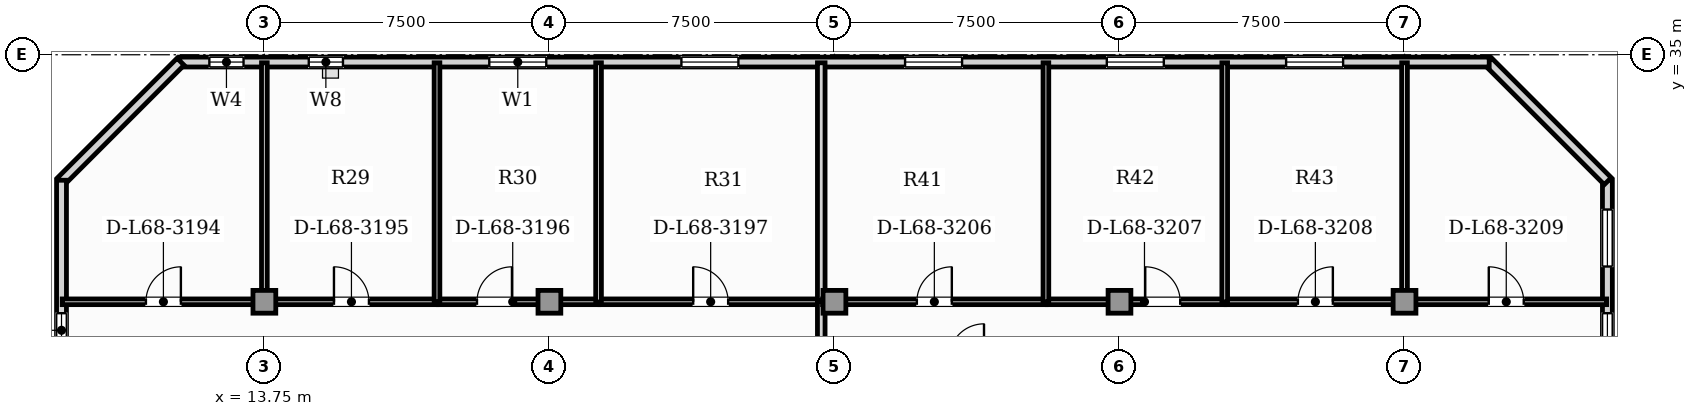
"""IFC4 building model, lengths in metres.
Left out: names, types, materials, properties, quantities, classifications, styles, units other than length and angle.
Written with IfcOpenShell. Run it as: python <this file> out.ifc"""

import sys

from ifc_helpers import new_model, si_unit, direction, frame, frame_2d, origin, origin_2d, place, context, subcontext, project, spatial, rectangle, extrude, element, fill, save


model = new_model("IFC4")
c1 = context("Model", 3, precision=1e-05, world=origin(), true_north=direction((0.0, 1.0)))
c2 = subcontext(c1, "Body", "Model", "MODEL_VIEW")
j1 = project(units=[si_unit("LENGTHUNIT", "METRE"), si_unit("PLANEANGLEUNIT", "RADIAN")], contexts=[c1])
p1 = place(None, origin())
s1 = spatial("IfcSite", under=j1, at=p1, CompositionType="ELEMENT")
p2 = place(p1, origin())
s2 = spatial("IfcBuilding", under=s1, at=p2, CompositionType="ELEMENT")
p3 = place(p2, frame((0.0, 0.0, 276.0)))
s3 = spatial("IfcBuildingStorey", under=s2, at=p3, CompositionType="ELEMENT", Elevation=276.0)
for number, where, z_axis, x_axis in (
    (1, (13.75, 28.5, 0.0), (0.0, 0.0, 1.0), (1.0, 0.0, 0.0)),
    (2, (21.25, 28.5, 0.0), (0.0, 0.0, 1.0), (1.0, 0.0, 0.0)),
    (3, (28.75, 28.5, 0.0), (0.0, 0.0, 1.0), (1.0, 0.0, 0.0)),
    (4, (36.25, 28.5, 0.0), (0.0, 0.0, 1.0), (1.0, 0.0, 0.0)),
    (5, (43.75, 28.5, 0.0), (0.0, 0.0, 1.0), (1.0, 0.0, 0.0)),
):
    element("IfcColumn", number, at=place(p3, frame(where, z_axis=z_axis, x_axis=x_axis)), inside=s3, PredefinedType="COLUMN", context=c2, shape_type="SweptSolid", body=[
        extrude(rectangle(XDim=0.6, YDim=0.6, at=origin_2d()), origin(), (0.0, 0.0, 1.0), 5.05),
    ])
p4 = place(p3, frame((49.088, 24.809, 0.0), z_axis=(0.0, 0.0, 1.0), x_axis=(0.0, 1.0, 0.0)))
e6 = element("IfcWall", 6, at=p4, inside=s3, PredefinedType="SOLIDWALL", context=c2, shape_type="SweptSolid", body=[
    extrude(rectangle(XDim=6.889, YDim=0.26, at=frame_2d((3.444, 0.0))), origin(), (0.0, 0.0, 1.0), 4.85),
])
p5 = place(p4, frame((2.491, 0.0, 0.95)))
e7 = element("IfcOpeningElement", 7, at=p5, cuts=e6, PredefinedType="OPENING", context=c2, shape_type="SweptSolid", body=[
    extrude(rectangle(XDim=0.9, YDim=1.5, at=frame_2d((0.45, 0.75))), frame((0.0, 0.14, 0.0), z_axis=(0.0, -1.0, 0.0), x_axis=(1.0, 0.0, 0.0)), (0.0, 0.0, 1.0), 0.28),
])
p6 = place(p4, frame((4.619, 0.0, 0.9)))
e8 = element("IfcOpeningElement", 8, at=p6, cuts=e6, PredefinedType="OPENING", context=c2, shape_type="SweptSolid", body=[
    extrude(rectangle(XDim=1.5, YDim=1.95, at=frame_2d((0.75, 0.975))), frame((0.0, 0.14, 0.0), z_axis=(0.0, -1.0, 0.0), x_axis=(1.0, 0.0, 0.0)), (0.0, 0.0, 1.0), 0.28),
])
p7 = place(p3, frame((49.098, 31.675, 0.0), z_axis=(0.0, 0.0, 1.0), x_axis=(-0.707134240044, 0.707079321262, 0.0)))
e9 = element("IfcWall", 9, at=p7, inside=s3, PredefinedType="SOLIDWALL", context=c2, shape_type="SweptSolid", body=[
    extrude(rectangle(XDim=4.446, YDim=0.26, at=frame_2d((2.223, 0.0))), origin(), (0.0, 0.0, 1.0), 4.85),
])
p8 = place(p3, frame((45.978, 34.808, 0.0), z_axis=(0.0, 0.0, 1.0), x_axis=(-1.0, 0.0, 0.0)))
e10 = element("IfcWall", 10, at=p8, inside=s3, PredefinedType="SOLIDWALL", context=c2, shape_type="SweptSolid", body=[
    extrude(rectangle(XDim=34.456, YDim=0.26, at=frame_2d((17.228, 0.0))), origin(), (0.0, 0.0, 1.0), 4.85),
])
p9 = place(p8, frame((32.776, 0.0, 0.95)))
e11 = element("IfcOpeningElement", 11, at=p9, cuts=e10, PredefinedType="OPENING", context=c2, shape_type="SweptSolid", body=[
    extrude(rectangle(XDim=0.9, YDim=1.5, at=frame_2d((0.45, 0.75))), frame((0.0, 0.14, 0.0), z_axis=(0.0, -1.0, 0.0), x_axis=(1.0, 0.0, 0.0)), (0.0, 0.0, 1.0), 0.28),
])
p10 = place(p8, frame((30.16, 0.0, 0.9)))
e12 = element("IfcOpeningElement", 12, at=p10, cuts=e10, PredefinedType="OPENING", context=c2, shape_type="SweptSolid", body=[
    extrude(rectangle(XDim=0.9, YDim=1.4, at=frame_2d((0.45, 0.7))), frame((0.0, 0.14, 0.0), z_axis=(0.0, -1.0, 0.0), x_axis=(1.0, 0.0, 0.0)), (0.0, 0.0, 1.0), 0.28),
])
p11 = place(p8, frame((24.811, 0.0, 0.9)))
e13 = element("IfcOpeningElement", 13, at=p11, cuts=e10, PredefinedType="OPENING", context=c2, shape_type="SweptSolid", body=[
    extrude(rectangle(XDim=1.5, YDim=1.95, at=frame_2d((0.75, 0.975))), frame((0.0, 0.14, 0.0), z_axis=(0.0, -1.0, 0.0), x_axis=(1.0, 0.0, 0.0)), (0.0, 0.0, 1.0), 0.28),
])
p12 = place(p8, frame((19.755, 0.0, 0.9)))
e14 = element("IfcOpeningElement", 14, at=p12, cuts=e10, PredefinedType="OPENING", context=c2, shape_type="SweptSolid", body=[
    extrude(rectangle(XDim=1.5, YDim=1.95, at=frame_2d((0.75, 0.975))), frame((0.0, 0.14, 0.0), z_axis=(0.0, -1.0, 0.0), x_axis=(1.0, 0.0, 0.0)), (0.0, 0.0, 1.0), 0.28),
])
p13 = place(p8, frame((13.87, 0.0, 0.9)))
e15 = element("IfcOpeningElement", 15, at=p13, cuts=e10, PredefinedType="OPENING", context=c2, shape_type="SweptSolid", body=[
    extrude(rectangle(XDim=1.5, YDim=1.95, at=frame_2d((0.75, 0.975))), frame((0.0, 0.14, 0.0), z_axis=(0.0, -1.0, 0.0), x_axis=(1.0, 0.0, 0.0)), (0.0, 0.0, 1.0), 0.28),
])
p14 = place(p8, frame((8.562, 0.0, 0.9)))
e16 = element("IfcOpeningElement", 16, at=p14, cuts=e10, PredefinedType="OPENING", context=c2, shape_type="SweptSolid", body=[
    extrude(rectangle(XDim=1.5, YDim=1.95, at=frame_2d((0.75, 0.975))), frame((0.0, 0.14, 0.0), z_axis=(0.0, -1.0, 0.0), x_axis=(1.0, 0.0, 0.0)), (0.0, 0.0, 1.0), 0.28),
])
p15 = place(p8, frame((3.844, 0.0, 0.9)))
e17 = element("IfcOpeningElement", 17, at=p15, cuts=e10, PredefinedType="OPENING", context=c2, shape_type="SweptSolid", body=[
    extrude(rectangle(XDim=1.5, YDim=1.95, at=frame_2d((0.75, 0.975))), frame((0.0, 0.14, 0.0), z_axis=(0.0, -1.0, 0.0), x_axis=(1.0, 0.0, 0.0)), (0.0, 0.0, 1.0), 0.28),
])
p16 = place(p3, frame((11.546, 34.818, 0.0), z_axis=(0.0, 0.0, 1.0), x_axis=(-0.707134240044, -0.707079321262, 0.0)))
e18 = element("IfcWall", 18, at=p16, inside=s3, PredefinedType="SOLIDWALL", context=c2, shape_type="SweptSolid", body=[
    extrude(rectangle(XDim=4.446, YDim=0.26, at=frame_2d((2.223, 0.0))), origin(), (0.0, 0.0, 1.0), 4.85),
])
p17 = place(p3, frame((8.412, 31.698, 0.0), z_axis=(0.0, 0.0, 1.0), x_axis=(0.0, -1.0, 0.0)))
e19 = element("IfcWall", 19, at=p17, inside=s3, PredefinedType="SOLIDWALL", context=c2, shape_type="SweptSolid", body=[
    extrude(rectangle(XDim=6.889, YDim=0.26, at=frame_2d((3.444, 0.0))), origin(), (0.0, 0.0, 1.0), 4.85),
])
p18 = place(p17, frame((3.498, 0.0, 0.95)))
e20 = element("IfcOpeningElement", 20, at=p18, cuts=e19, PredefinedType="OPENING", context=c2, shape_type="SweptSolid", body=[
    extrude(rectangle(XDim=0.9, YDim=1.5, at=frame_2d((0.45, 0.75))), frame((0.0, 0.14, 0.0), z_axis=(0.0, -1.0, 0.0), x_axis=(1.0, 0.0, 0.0)), (0.0, 0.0, 1.0), 0.28),
])
p19 = place(p3, frame((8.431, 28.5, 0.0), z_axis=(0.0, 0.0, 1.0), x_axis=(1.0, 0.0, 0.0)))
e21 = element("IfcWall", 21, at=p19, inside=s3, PredefinedType="PARTITIONING", context=c2, shape_type="SweptSolid", body=[
    extrude(rectangle(XDim=5.323, YDim=0.15, at=frame_2d((2.662, 0.0))), origin(), (0.0, 0.0, 1.0), 4.85),
])
p20 = place(p19, frame((2.202, 0.0, 0.0)))
e22 = element("IfcOpeningElement", 22, at=p20, cuts=e21, PredefinedType="OPENING", context=c2, shape_type="SweptSolid", body=[
    extrude(rectangle(XDim=0.92, YDim=2.1, at=frame_2d((0.46, 1.05))), frame((0.0, 0.085, 0.0), z_axis=(0.0, -1.0, 0.0), x_axis=(1.0, 0.0, 0.0)), (0.0, 0.0, 1.0), 0.17),
])
p21 = place(p3, frame((13.785, 28.5, 0.0), z_axis=(0.0, 0.0, 1.0), x_axis=(1.0, 0.0, 0.0)))
e23 = element("IfcWall", 23, at=p21, inside=s3, PredefinedType="PARTITIONING", context=c2, shape_type="SweptSolid", body=[
    extrude(rectangle(XDim=4.512, YDim=0.15, at=frame_2d((2.256, 0.0))), origin(), (0.0, 0.0, 1.0), 4.305),
])
p22 = place(p21, frame((1.796, 0.0, 0.0)))
e24 = element("IfcOpeningElement", 24, at=p22, cuts=e23, PredefinedType="OPENING", context=c2, shape_type="SweptSolid", body=[
    extrude(rectangle(XDim=0.92, YDim=2.1, at=frame_2d((0.46, 1.05))), frame((0.0, 0.085, 0.0), z_axis=(0.0, -1.0, 0.0), x_axis=(1.0, 0.0, 0.0)), (0.0, 0.0, 1.0), 0.17),
])
p23 = place(p3, frame((18.327, 28.5, 0.0), z_axis=(0.0, 0.0, 1.0), x_axis=(1.0, 0.0, 0.0)))
e25 = element("IfcWall", 25, at=p23, inside=s3, PredefinedType="PARTITIONING", context=c2, shape_type="SweptSolid", body=[
    extrude(rectangle(XDim=4.221, YDim=0.15, at=frame_2d((2.111, 0.0))), origin(), (0.0, 0.0, 1.0), 4.305),
])
p24 = place(p23, frame((1.017, 0.0, 0.0)))
e26 = element("IfcOpeningElement", 26, at=p24, cuts=e25, PredefinedType="OPENING", context=c2, shape_type="SweptSolid", body=[
    extrude(rectangle(XDim=0.92, YDim=2.1, at=frame_2d((0.46, 1.05))), frame((0.0, 0.085, 0.0), z_axis=(0.0, -1.0, 0.0), x_axis=(1.0, 0.0, 0.0)), (0.0, 0.0, 1.0), 0.17),
])
p25 = place(p3, frame((22.578, 28.5, 0.0), z_axis=(0.0, 0.0, 1.0), x_axis=(1.0, 0.0, 0.0)))
e27 = element("IfcWall", 27, at=p25, inside=s3, PredefinedType="PARTITIONING", context=c2, shape_type="SweptSolid", body=[
    extrude(rectangle(XDim=5.83, YDim=0.15, at=frame_2d((2.915, 0.0))), origin(), (0.0, 0.0, 1.0), 4.305),
])
p26 = place(p25, frame((2.455, 0.0, 0.0)))
e28 = element("IfcOpeningElement", 28, at=p26, cuts=e27, PredefinedType="OPENING", context=c2, shape_type="SweptSolid", body=[
    extrude(rectangle(XDim=0.92, YDim=2.1, at=frame_2d((0.46, 1.05))), frame((0.0, 0.085, 0.0), z_axis=(0.0, -1.0, 0.0), x_axis=(1.0, 0.0, 0.0)), (0.0, 0.0, 1.0), 0.17),
])
p27 = place(p3, frame((28.403, 26.995, 0.0), z_axis=(0.0, 0.0, 1.0), x_axis=(0.0, 1.0, 0.0)))
e29 = element("IfcWall", 29, at=p27, inside=s3, PredefinedType="PARTITIONING", context=c2, shape_type="SweptSolid", body=[
    extrude(rectangle(XDim=1.51, YDim=0.2, at=frame_2d((0.755, 0.0))), origin(), (0.0, 0.0, 1.0), 4.85),
])
for number, where, z_axis, x_axis in (
    (30, (13.75, 28.495, 0.0), (0.0, 0.0, 1.0), (0.0, 1.0, 0.0)),
    (31, (18.292, 28.495, 0.0), (0.0, 0.0, 1.0), (0.0, 1.0, 0.0)),
    (32, (22.543, 28.495, 0.0), (0.0, 0.0, 1.0), (0.0, 1.0, 0.0)),
):
    element("IfcWall", number, at=place(p3, frame(where, z_axis=z_axis, x_axis=x_axis)), inside=s3, PredefinedType="PARTITIONING", context=c2, shape_type="SweptSolid", body=[
        extrude(rectangle(XDim=6.293, YDim=0.15, at=frame_2d((3.147, 0.0))), origin(), (0.0, 0.0, 1.0), 4.85),
    ])
p28 = place(p3, frame((28.403, 28.535, 0.0), z_axis=(0.0, 0.0, 1.0), x_axis=(0.0, 1.0, 0.0)))
e33 = element("IfcWall", 33, at=p28, inside=s3, PredefinedType="PARTITIONING", context=c2, shape_type="SweptSolid", body=[
    extrude(rectangle(XDim=6.254, YDim=0.2, at=frame_2d((3.127, 0.0))), origin(), (0.0, 0.0, 1.0), 4.85),
])
p29 = place(p3, frame((28.438, 28.5, 0.0), z_axis=(0.0, 0.0, 1.0), x_axis=(1.0, 0.0, 0.0)))
e34 = element("IfcWall", 34, at=p29, inside=s3, PredefinedType="PARTITIONING", context=c2, shape_type="SweptSolid", body=[
    extrude(rectangle(XDim=5.881, YDim=0.15, at=frame_2d((2.941, 0.0))), origin(), (0.0, 0.0, 1.0), 4.305),
])
p30 = place(p29, frame((2.481, 0.0, 0.0)))
e35 = element("IfcOpeningElement", 35, at=p30, cuts=e34, PredefinedType="OPENING", context=c2, shape_type="SweptSolid", body=[
    extrude(rectangle(XDim=0.92, YDim=2.1, at=frame_2d((0.46, 1.05))), frame((0.0, 0.085, 0.0), z_axis=(0.0, -1.0, 0.0), x_axis=(1.0, 0.0, 0.0)), (0.0, 0.0, 1.0), 0.17),
])
p31 = place(p3, frame((34.349, 28.5, 0.0), z_axis=(0.0, 0.0, 1.0), x_axis=(1.0, 0.0, 0.0)))
e36 = element("IfcWall", 36, at=p31, inside=s3, PredefinedType="PARTITIONING", context=c2, shape_type="SweptSolid", body=[
    extrude(rectangle(XDim=4.675, YDim=0.15, at=frame_2d((2.337, 0.0))), origin(), (0.0, 0.0, 1.0), 4.305),
])
p32 = place(p31, frame((2.579, 0.0, 0.0)))
e37 = element("IfcOpeningElement", 37, at=p32, cuts=e36, PredefinedType="OPENING", context=c2, shape_type="SweptSolid", body=[
    extrude(rectangle(XDim=0.92, YDim=2.1, at=frame_2d((0.46, 1.05))), frame((0.0, 0.085, 0.0), z_axis=(0.0, -1.0, 0.0), x_axis=(1.0, 0.0, 0.0)), (0.0, 0.0, 1.0), 0.17),
])
p33 = place(p3, frame((39.054, 28.5, 0.0), z_axis=(0.0, 0.0, 1.0), x_axis=(1.0, 0.0, 0.0)))
e38 = element("IfcWall", 38, at=p33, inside=s3, PredefinedType="PARTITIONING", context=c2, shape_type="SweptSolid", body=[
    extrude(rectangle(XDim=4.701, YDim=0.15, at=frame_2d((2.351, 0.0))), origin(), (0.0, 0.0, 1.0), 4.305),
])
p34 = place(p33, frame((1.891, 0.0, 0.0)))
e39 = element("IfcOpeningElement", 39, at=p34, cuts=e38, PredefinedType="OPENING", context=c2, shape_type="SweptSolid", body=[
    extrude(rectangle(XDim=0.92, YDim=2.1, at=frame_2d((0.46, 1.05))), frame((0.0, 0.085, 0.0), z_axis=(0.0, -1.0, 0.0), x_axis=(1.0, 0.0, 0.0)), (0.0, 0.0, 1.0), 0.17),
])
p35 = place(p3, frame((43.785, 28.5, 0.0), z_axis=(0.0, 0.0, 1.0), x_axis=(1.0, 0.0, 0.0)))
e40 = element("IfcWall", 40, at=p35, inside=s3, PredefinedType="PARTITIONING", context=c2, shape_type="SweptSolid", body=[
    extrude(rectangle(XDim=5.284, YDim=0.15, at=frame_2d((2.642, 0.0))), origin(), (0.0, 0.0, 1.0), 4.85),
])
p36 = place(p35, frame((2.182, 0.0, 0.0)))
e41 = element("IfcOpeningElement", 41, at=p36, cuts=e40, PredefinedType="OPENING", context=c2, shape_type="SweptSolid", body=[
    extrude(rectangle(XDim=0.92, YDim=2.1, at=frame_2d((0.46, 1.05))), frame((0.0, 0.085, 0.0), z_axis=(0.0, -1.0, 0.0), x_axis=(1.0, 0.0, 0.0)), (0.0, 0.0, 1.0), 0.17),
])
for number, where, z_axis, x_axis in (
    (42, (34.314, 28.495, 0.0), (0.0, 0.0, 1.0), (0.0, 1.0, 0.0)),
    (43, (39.019, 28.495, 0.0), (0.0, 0.0, 1.0), (0.0, 1.0, 0.0)),
    (44, (43.75, 28.495, 0.0), (0.0, 0.0, 1.0), (0.0, 1.0, 0.0)),
):
    element("IfcWall", number, at=place(p3, frame(where, z_axis=z_axis, x_axis=x_axis)), inside=s3, PredefinedType="PARTITIONING", context=c2, shape_type="SweptSolid", body=[
        extrude(rectangle(XDim=6.293, YDim=0.15, at=frame_2d((3.147, 0.0))), origin(), (0.0, 0.0, 1.0), 4.85),
    ])
p37 = place(p18, origin())
e45 = element("IfcWindow", 45, at=p37, inside=s3, PartitioningType="SINGLE_PANEL", PredefinedType="WINDOW", context=c2, shape_type="SweptSolid", body=[
    extrude(rectangle(XDim=0.9, YDim=1.5, at=frame_2d((0.45, 0.75))), frame((0.0, 0.03, 0.0), z_axis=(0.0, -1.0, 0.0), x_axis=(1.0, 0.0, 0.0)), (0.0, 0.0, 1.0), 0.06),
])
fill(e20, e45)
p38 = place(p9, origin())
e46 = element("IfcWindow", 46, at=p38, inside=s3, PartitioningType="SINGLE_PANEL", PredefinedType="WINDOW", context=c2, shape_type="SweptSolid", body=[
    extrude(rectangle(XDim=0.9, YDim=1.5, at=frame_2d((0.45, 0.75))), frame((0.0, 0.03, 0.0), z_axis=(0.0, -1.0, 0.0), x_axis=(1.0, 0.0, 0.0)), (0.0, 0.0, 1.0), 0.06),
])
fill(e11, e46)
p39 = place(p10, origin())
e47 = element("IfcWindow", 47, at=p39, inside=s3, PartitioningType="SINGLE_PANEL", PredefinedType="WINDOW", context=c2, shape_type="SweptSolid", body=[
    extrude(rectangle(XDim=0.9, YDim=1.4, at=frame_2d((0.45, 0.7))), frame((0.0, 0.03, 0.0), z_axis=(0.0, -1.0, 0.0), x_axis=(1.0, 0.0, 0.0)), (0.0, 0.0, 1.0), 0.06),
])
fill(e12, e47)
p40 = place(p11, origin())
e48 = element("IfcWindow", 48, at=p40, inside=s3, PartitioningType="SINGLE_PANEL", PredefinedType="WINDOW", context=c2, shape_type="SweptSolid", body=[
    extrude(rectangle(XDim=1.5, YDim=1.95, at=frame_2d((0.75, 0.975))), frame((0.0, 0.03, 0.0), z_axis=(0.0, -1.0, 0.0), x_axis=(1.0, 0.0, 0.0)), (0.0, 0.0, 1.0), 0.06),
])
fill(e13, e48)
p41 = place(p12, origin())
e49 = element("IfcWindow", 49, at=p41, inside=s3, PartitioningType="SINGLE_PANEL", PredefinedType="WINDOW", context=c2, shape_type="SweptSolid", body=[
    extrude(rectangle(XDim=1.5, YDim=1.95, at=frame_2d((0.75, 0.975))), frame((0.0, 0.03, 0.0), z_axis=(0.0, -1.0, 0.0), x_axis=(1.0, 0.0, 0.0)), (0.0, 0.0, 1.0), 0.06),
])
fill(e14, e49)
p42 = place(p5, origin())
e50 = element("IfcWindow", 50, at=p42, inside=s3, PartitioningType="SINGLE_PANEL", PredefinedType="WINDOW", context=c2, shape_type="SweptSolid", body=[
    extrude(rectangle(XDim=0.9, YDim=1.5, at=frame_2d((0.45, 0.75))), frame((0.0, 0.03, 0.0), z_axis=(0.0, -1.0, 0.0), x_axis=(1.0, 0.0, 0.0)), (0.0, 0.0, 1.0), 0.06),
])
fill(e7, e50)
p43 = place(p13, origin())
e51 = element("IfcWindow", 51, at=p43, inside=s3, PartitioningType="SINGLE_PANEL", PredefinedType="WINDOW", context=c2, shape_type="SweptSolid", body=[
    extrude(rectangle(XDim=1.5, YDim=1.95, at=frame_2d((0.75, 0.975))), frame((0.0, 0.03, 0.0), z_axis=(0.0, -1.0, 0.0), x_axis=(1.0, 0.0, 0.0)), (0.0, 0.0, 1.0), 0.06),
])
fill(e15, e51)
p44 = place(p14, origin())
e52 = element("IfcWindow", 52, at=p44, inside=s3, PartitioningType="SINGLE_PANEL", PredefinedType="WINDOW", context=c2, shape_type="SweptSolid", body=[
    extrude(rectangle(XDim=1.5, YDim=1.95, at=frame_2d((0.75, 0.975))), frame((0.0, 0.03, 0.0), z_axis=(0.0, -1.0, 0.0), x_axis=(1.0, 0.0, 0.0)), (0.0, 0.0, 1.0), 0.06),
])
fill(e16, e52)
p45 = place(p15, origin())
e53 = element("IfcWindow", 53, at=p45, inside=s3, PartitioningType="SINGLE_PANEL", PredefinedType="WINDOW", context=c2, shape_type="SweptSolid", body=[
    extrude(rectangle(XDim=1.5, YDim=1.95, at=frame_2d((0.75, 0.975))), frame((0.0, 0.03, 0.0), z_axis=(0.0, -1.0, 0.0), x_axis=(1.0, 0.0, 0.0)), (0.0, 0.0, 1.0), 0.06),
])
fill(e17, e53)
p46 = place(p6, origin())
e54 = element("IfcWindow", 54, at=p46, inside=s3, PartitioningType="SINGLE_PANEL", PredefinedType="WINDOW", context=c2, shape_type="SweptSolid", body=[
    extrude(rectangle(XDim=1.5, YDim=1.95, at=frame_2d((0.75, 0.975))), frame((0.0, 0.03, 0.0), z_axis=(0.0, -1.0, 0.0), x_axis=(1.0, 0.0, 0.0)), (0.0, 0.0, 1.0), 0.06),
])
fill(e8, e54)
p47 = place(p20, origin())
e55 = element("IfcDoor", 55, at=p47, inside=s3, OperationType="SINGLE_SWING_RIGHT", PredefinedType="DOOR", context=c2, shape_type="SweptSolid", body=[
    extrude(rectangle(XDim=0.92, YDim=2.1, at=frame_2d((0.46, 1.05))), frame((0.0, 0.025, 0.0), z_axis=(0.0, -1.0, 0.0), x_axis=(1.0, 0.0, 0.0)), (0.0, 0.0, 1.0), 0.05),
])
fill(e22, e55)
p48 = place(p22, origin())
e56 = element("IfcDoor", 56, at=p48, inside=s3, OperationType="SINGLE_SWING_LEFT", PredefinedType="DOOR", context=c2, shape_type="SweptSolid", body=[
    extrude(rectangle(XDim=0.92, YDim=2.1, at=frame_2d((0.46, 1.05))), frame((0.0, 0.025, 0.0), z_axis=(0.0, -1.0, 0.0), x_axis=(1.0, 0.0, 0.0)), (0.0, 0.0, 1.0), 0.05),
])
fill(e24, e56)
p49 = place(p24, origin())
e57 = element("IfcDoor", 57, at=p49, inside=s3, OperationType="SINGLE_SWING_RIGHT", PredefinedType="DOOR", context=c2, shape_type="SweptSolid", body=[
    extrude(rectangle(XDim=0.92, YDim=2.1, at=frame_2d((0.46, 1.05))), frame((0.0, 0.025, 0.0), z_axis=(0.0, -1.0, 0.0), x_axis=(1.0, 0.0, 0.0)), (0.0, 0.0, 1.0), 0.05),
])
fill(e26, e57)
p50 = place(p26, origin())
e58 = element("IfcDoor", 58, at=p50, inside=s3, OperationType="SINGLE_SWING_LEFT", PredefinedType="DOOR", context=c2, shape_type="SweptSolid", body=[
    extrude(rectangle(XDim=0.92, YDim=2.1, at=frame_2d((0.46, 1.05))), frame((0.0, 0.025, 0.0), z_axis=(0.0, -1.0, 0.0), x_axis=(1.0, 0.0, 0.0)), (0.0, 0.0, 1.0), 0.05),
])
fill(e28, e58)
p51 = place(p30, origin())
e59 = element("IfcDoor", 59, at=p51, inside=s3, OperationType="SINGLE_SWING_RIGHT", PredefinedType="DOOR", context=c2, shape_type="SweptSolid", body=[
    extrude(rectangle(XDim=0.92, YDim=2.1, at=frame_2d((0.46, 1.05))), frame((0.0, 0.025, 0.0), z_axis=(0.0, -1.0, 0.0), x_axis=(1.0, 0.0, 0.0)), (0.0, 0.0, 1.0), 0.05),
])
fill(e35, e59)
p52 = place(p32, origin())
e60 = element("IfcDoor", 60, at=p52, inside=s3, OperationType="SINGLE_SWING_LEFT", PredefinedType="DOOR", context=c2, shape_type="SweptSolid", body=[
    extrude(rectangle(XDim=0.92, YDim=2.1, at=frame_2d((0.46, 1.05))), frame((0.0, 0.025, 0.0), z_axis=(0.0, -1.0, 0.0), x_axis=(1.0, 0.0, 0.0)), (0.0, 0.0, 1.0), 0.05),
])
fill(e37, e60)
p53 = place(p34, origin())
e61 = element("IfcDoor", 61, at=p53, inside=s3, OperationType="SINGLE_SWING_RIGHT", PredefinedType="DOOR", context=c2, shape_type="SweptSolid", body=[
    extrude(rectangle(XDim=0.92, YDim=2.1, at=frame_2d((0.46, 1.05))), frame((0.0, 0.025, 0.0), z_axis=(0.0, -1.0, 0.0), x_axis=(1.0, 0.0, 0.0)), (0.0, 0.0, 1.0), 0.05),
])
fill(e39, e61)
p54 = place(p36, origin())
e62 = element("IfcDoor", 62, at=p54, inside=s3, OperationType="SINGLE_SWING_LEFT", PredefinedType="DOOR", context=c2, shape_type="SweptSolid", body=[
    extrude(rectangle(XDim=0.92, YDim=2.1, at=frame_2d((0.46, 1.05))), frame((0.0, 0.025, 0.0), z_axis=(0.0, -1.0, 0.0), x_axis=(1.0, 0.0, 0.0)), (0.0, 0.0, 1.0), 0.05),
])
fill(e41, e62)
save(model, sys.argv[1])
